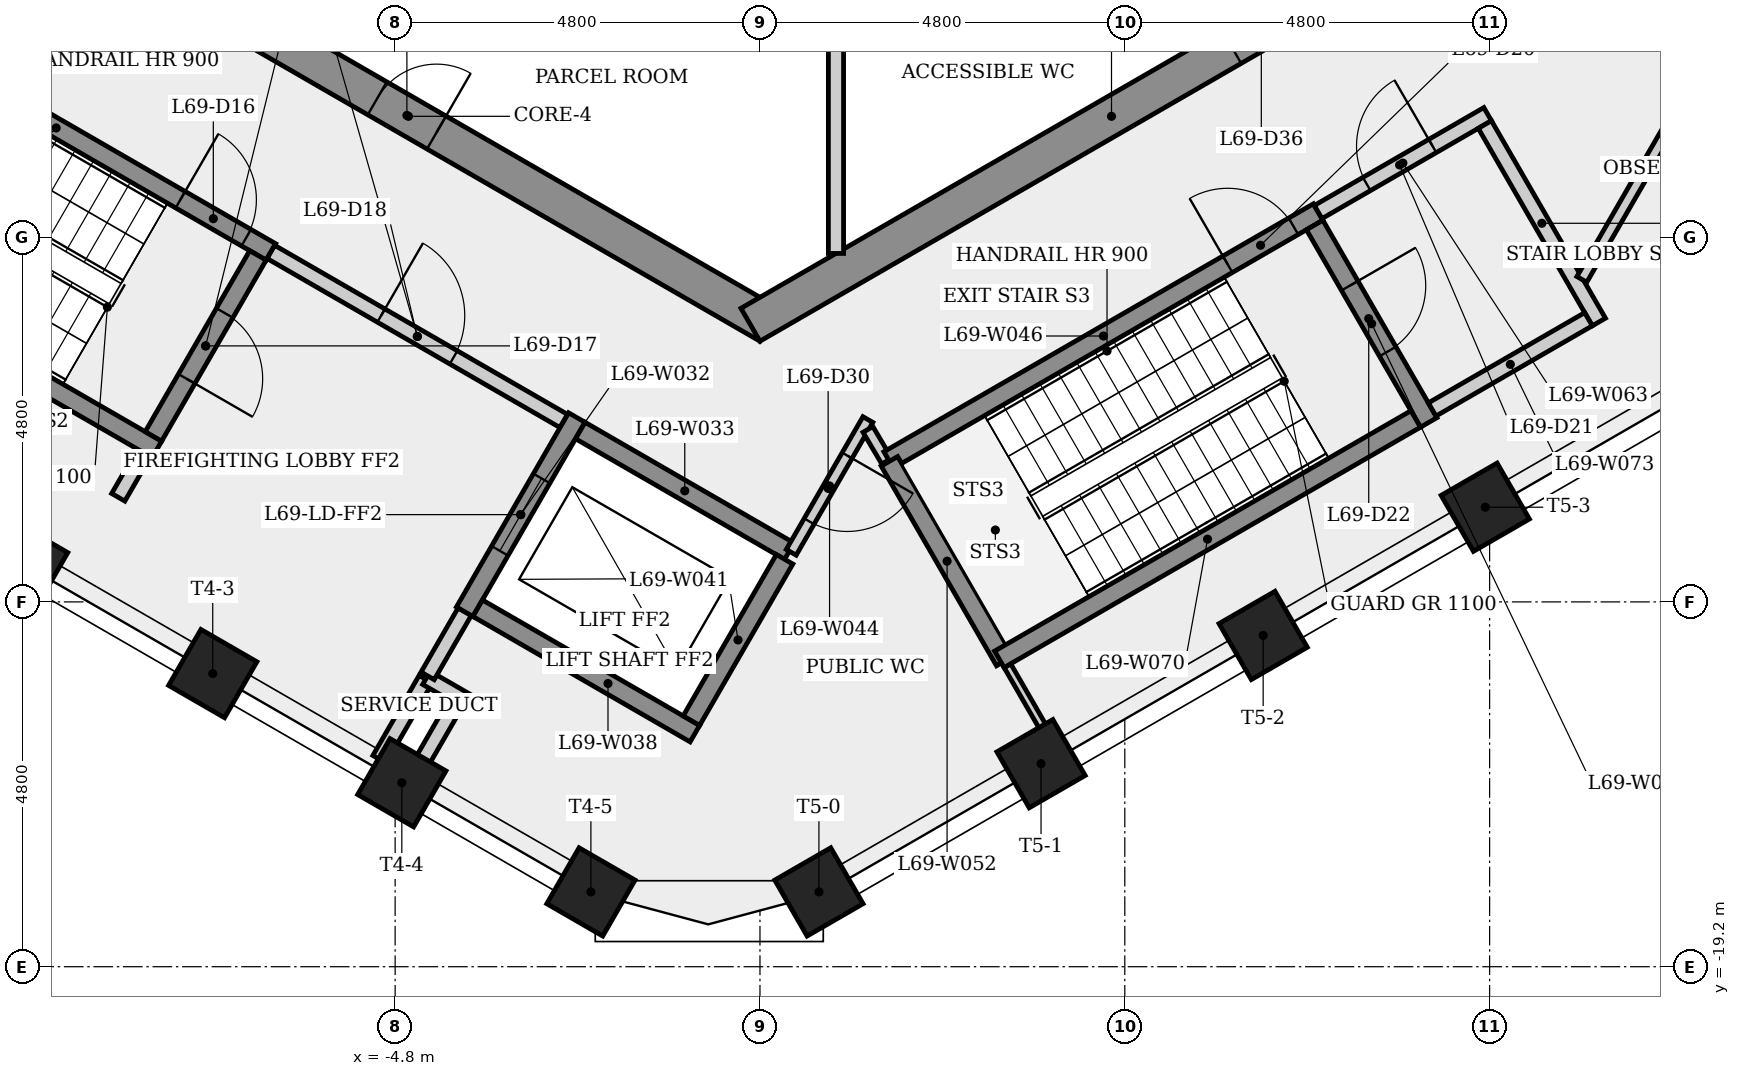
"""IFC4 building model, lengths in metres.
Left out: names, types, materials, properties, quantities, classifications, styles, units other than length and angle.
Written with IfcOpenShell. Run it as: python <this file> out.ifc"""

import sys

from ifc_helpers import new_model, si_unit, direction, frame, frame_2d, origin, origin_2d, place, context, subcontext, project, spatial, rectangle, extrude, element, fill, save


model = new_model("IFC4")
c1 = context("Model", 3, precision=1e-05, world=origin(), true_north=direction((0.0, 1.0)))
c2 = subcontext(c1, "Body", "Model", "MODEL_VIEW")
j1 = project(units=[si_unit("LENGTHUNIT", "METRE"), si_unit("PLANEANGLEUNIT", "RADIAN")], contexts=[c1])
p1 = place(None, origin())
s1 = spatial("IfcSite", under=j1, at=p1, CompositionType="ELEMENT")
p2 = place(p1, origin())
s2 = spatial("IfcBuilding", under=s1, at=p2, CompositionType="ELEMENT")
p3 = place(p2, frame((0.0, 0.0, 257.9)))
s3 = spatial("IfcBuildingStorey", under=s2, at=p3, CompositionType="ELEMENT", Elevation=257.9)
p4 = place(p3, frame((-9.375, -5.268, 0.0), z_axis=(0.0, 0.0, 1.0), x_axis=(0.866023993627, -0.500002442456, 0.0)))
e1 = element("IfcWall", 1, at=p4, inside=s3, PredefinedType="SHEAR", context=c2, shape_type="SweptSolid", body=[
    extrude(rectangle(XDim=10.97, YDim=0.5, at=frame_2d((5.485, 0.0))), origin(), (0.0, 0.0, 1.0), 5.0),
])
p5 = place(p4, frame((5.011, 0.0, 0.0)))
e2 = element("IfcOpeningElement", 2, at=p5, cuts=e1, PredefinedType="OPENING", context=c2, shape_type="SweptSolid", body=[
    extrude(rectangle(XDim=0.9, YDim=2.1, at=frame_2d((0.45, 1.05))), frame((0.0, 0.26, 0.0), z_axis=(0.0, -1.0, 0.0), x_axis=(1.0, 0.0, 0.0)), (0.0, 0.0, 1.0), 0.52),
])
p6 = place(p3, frame((-0.125, -10.753, 0.0), z_axis=(0.0, 0.0, 1.0), x_axis=(0.866023993627, 0.500002442456, 0.0)))
e3 = element("IfcWall", 3, at=p6, inside=s3, PredefinedType="SHEAR", context=c2, shape_type="SweptSolid", body=[
    extrude(rectangle(XDim=10.97, YDim=0.5, at=frame_2d((5.485, 0.0))), origin(), (0.0, 0.0, 1.0), 5.0),
])
p7 = place(p6, frame((7.311, 0.0, 0.0)))
e4 = element("IfcOpeningElement", 4, at=p7, cuts=e3, PredefinedType="OPENING", context=c2, shape_type="SweptSolid", body=[
    extrude(rectangle(XDim=0.9, YDim=2.1, at=frame_2d((0.45, 1.05))), frame((0.0, 0.26, 0.0), z_axis=(0.0, -1.0, 0.0), x_axis=(1.0, 0.0, 0.0)), (0.0, 0.0, 1.0), 0.52),
])
for number, where, z_axis, x_axis in (
    (5, (-9.688, -13.907, 0.0), (0.0, 0.0, 1.0), (-0.5, -0.866, 0.0)),
    (6, (-7.2, -15.343, 0.0), (0.0, 0.0, 1.0), (-0.5, -0.866, 0.0)),
    (7, (-4.712, -16.78, 0.0), (0.0, 0.0, 1.0), (-0.5, -0.866, 0.0)),
    (8, (-2.224, -18.216, 0.0), (0.0, 0.0, 1.0), (-0.5, -0.866, 0.0)),
    (9, (0.776, -18.216, 0.0), (0.0, 0.0, 1.0), (0.5, -0.866, 0.0)),
    (10, (3.698, -16.529, 0.0), (0.0, 0.0, 1.0), (0.5, -0.866, 0.0)),
    (11, (6.62, -14.841, 0.0), (0.0, 0.0, 1.0), (0.5, -0.866, 0.0)),
    (12, (9.543, -13.154, 0.0), (0.0, 0.0, 1.0), (0.5, -0.866, 0.0)),
):
    element("IfcColumn", number, at=place(p3, frame(where, z_axis=z_axis, x_axis=x_axis)), inside=s3, PredefinedType="COLUMN", context=c2, shape_type="SweptSolid", body=[
        extrude(rectangle(XDim=0.85, YDim=0.85, at=origin_2d()), origin(), (0.0, 0.0, 1.0), 5.0),
    ])
p8 = place(p3, frame((-12.085, -6.532, 0.0), z_axis=(0.0, 0.0, 1.0), x_axis=(0.866031063448, -0.499990197047, 0.0)))
e13 = element("IfcWall", 13, at=p8, inside=s3, PredefinedType="SHEAR", context=c2, shape_type="SweptSolid", body=[
    extrude(rectangle(XDim=6.525, YDim=0.25, at=frame_2d((3.263, 0.0))), origin(), (0.0, 0.0, 1.0), 4.6),
])
p9 = place(p8, frame((5.15, 0.0, 0.0)))
e14 = element("IfcOpeningElement", 14, at=p9, cuts=e13, PredefinedType="OPENING", context=c2, shape_type="SweptSolid", body=[
    extrude(rectangle(XDim=1.0, YDim=2.1, at=frame_2d((0.5, 1.05))), frame((0.0, 0.135, 0.0), z_axis=(0.0, -1.0, 0.0), x_axis=(1.0, 0.0, 0.0)), (0.0, 0.0, 1.0), 0.27),
])
p10 = place(p3, frame((-8.443, -13.023, 0.0), z_axis=(0.0, 0.0, 1.0), x_axis=(0.500066738792, 0.865986868696, 0.0)))
e15 = element("IfcWall", 15, at=p10, inside=s3, PredefinedType="PARTITIONING", context=c2, shape_type="SweptSolid", body=[
    extrude(rectangle(XDim=0.675, YDim=0.2, at=frame_2d((0.338, 0.0))), origin(), (0.0, 0.0, 1.0), 4.6),
])
p11 = place(p3, frame((-7.935, -12.393, 0.0), z_axis=(0.0, 0.0, 1.0), x_axis=(-0.866031063448, 0.499990197047, 0.0)))
e16 = element("IfcWall", 16, at=p11, inside=s3, PredefinedType="SHEAR", context=c2, shape_type="SweptSolid", body=[
    extrude(rectangle(XDim=6.525, YDim=0.25, at=frame_2d((3.263, 0.0))), origin(), (0.0, 0.0, 1.0), 4.6),
])
p12 = place(p3, frame((-6.605, -9.841, 0.0), z_axis=(0.0, 0.0, 1.0), x_axis=(-0.499996545922, -0.866027397988, 0.0)))
e17 = element("IfcWall", 17, at=p12, inside=s3, PredefinedType="SHEAR", context=c2, shape_type="SweptSolid", body=[
    extrude(rectangle(XDim=2.75, YDim=0.25, at=frame_2d((1.375, 0.0))), origin(), (0.0, 0.0, 1.0), 4.6),
])
p13 = place(p12, frame((0.875, 0.0, 0.0)))
e18 = element("IfcOpeningElement", 18, at=p13, cuts=e17, PredefinedType="OPENING", context=c2, shape_type="SweptSolid", body=[
    extrude(rectangle(XDim=1.0, YDim=2.1, at=frame_2d((0.5, 1.05))), frame((0.0, 0.135, 0.0), z_axis=(0.0, -1.0, 0.0), x_axis=(1.0, 0.0, 0.0)), (0.0, 0.0, 1.0), 0.27),
])
p14 = place(p3, frame((-6.435, -9.795, 0.0), z_axis=(0.0, 0.0, 1.0), x_axis=(0.866012907634, -0.500021643343, 0.0)))
e19 = element("IfcWall", 19, at=p14, inside=s3, PredefinedType="PARTITIONING", context=c2, shape_type="SweptSolid", body=[
    extrude(rectangle(XDim=4.45, YDim=0.2, at=frame_2d((2.225, 0.0))), origin(), (0.0, 0.0, 1.0), 4.6),
])
p15 = place(p14, frame((1.675, 0.0, 0.0)))
e20 = element("IfcOpeningElement", 20, at=p15, cuts=e19, PredefinedType="OPENING", context=c2, shape_type="SweptSolid", body=[
    extrude(rectangle(XDim=1.1, YDim=2.1, at=frame_2d((0.55, 1.05))), frame((0.0, 0.11, 0.0), z_axis=(0.0, -1.0, 0.0), x_axis=(1.0, 0.0, 0.0)), (0.0, 0.0, 1.0), 0.22),
])
p16 = place(p3, frame((-5.006, -16.471, 0.0), z_axis=(0.0, 0.0, 1.0), x_axis=(0.499913398087, 0.866075397649, 0.0)))
e21 = element("IfcWall", 21, at=p16, inside=s3, PredefinedType="PLUMBINGWALL", context=c2, shape_type="SweptSolid", body=[
    extrude(rectangle(XDim=1.218, YDim=0.2, at=frame_2d((0.609, 0.0))), origin(), (0.0, 0.0, 1.0), 4.6),
])
for number, where, z_axis, x_axis in (
    (22, (-4.497, -16.788, 0.0), (0.0, 0.0, 1.0), (-0.866, 0.5, 0.0)),
    (23, (-4.387, -15.399, 0.0), (0.0, 0.0, 1.0), (0.866, -0.5, 0.0)),
):
    element("IfcWall", number, at=place(p3, frame(where, z_axis=z_axis, x_axis=x_axis)), inside=s3, PredefinedType="PLUMBINGWALL", context=c2, shape_type="SweptSolid", body=[
        extrude(rectangle(XDim=0.6, YDim=0.2, at=frame_2d((0.3, 0.0))), origin(), (0.0, 0.0, 1.0), 4.6),
    ])
p17 = place(p3, frame((-4.004, -15.736, 0.0), z_axis=(0.0, 0.0, 1.0), x_axis=(-0.500062184469, -0.865989498588, 0.0)))
e24 = element("IfcWall", 24, at=p17, inside=s3, PredefinedType="PLUMBINGWALL", context=c2, shape_type="SweptSolid", body=[
    extrude(rectangle(XDim=1.057, YDim=0.2, at=frame_2d((0.529, 0.0))), origin(), (0.0, 0.0, 1.0), 4.6),
])
p18 = place(p3, frame((-3.885, -14.529, 0.0), z_axis=(0.0, 0.0, 1.0), x_axis=(-0.49998975084, -0.866031321059, 0.0)))
e25 = element("IfcWall", 25, at=p18, inside=s3, PredefinedType="PARTITIONING", context=c2, shape_type="SweptSolid", body=[
    extrude(rectangle(XDim=0.975, YDim=0.2, at=frame_2d((0.488, 0.0))), origin(), (0.0, 0.0, 1.0), 4.6),
])
p19 = place(p3, frame((-2.41, -11.974, 0.0), z_axis=(0.0, 0.0, 1.0), x_axis=(-0.500001826776, -0.866024349092, 0.0)))
e26 = element("IfcWall", 26, at=p19, inside=s3, PredefinedType="SHEAR", context=c2, shape_type="SweptSolid", body=[
    extrude(rectangle(XDim=2.95, YDim=0.25, at=frame_2d((1.475, 0.0))), origin(), (0.0, 0.0, 1.0), 4.6),
])
p20 = place(p19, frame((0.925, 0.0, 0.0)))
e27 = element("IfcOpeningElement", 27, at=p20, cuts=e26, PredefinedType="OPENING", context=c2, shape_type="SweptSolid", body=[
    extrude(rectangle(XDim=1.1, YDim=2.1, at=frame_2d((0.55, 1.05))), frame((0.0, 0.135, 0.0), z_axis=(0.0, -1.0, 0.0), x_axis=(1.0, 0.0, 0.0)), (0.0, 0.0, 1.0), 0.27),
])
p21 = place(p3, frame((-2.364, -12.145, 0.0), z_axis=(0.0, 0.0, 1.0), x_axis=(0.866048579423, -0.499959856469, 0.0)))
e28 = element("IfcWall", 28, at=p21, inside=s3, PredefinedType="SHEAR", context=c2, shape_type="SweptSolid", body=[
    extrude(rectangle(XDim=3.175, YDim=0.25, at=frame_2d((1.587, 0.0))), origin(), (0.0, 0.0, 1.0), 5.0),
])
p22 = place(p3, frame((-0.856, -16.133, 0.0), z_axis=(0.0, 0.0, 1.0), x_axis=(-0.866021716278, 0.500006386895, 0.0)))
e29 = element("IfcWall", 29, at=p22, inside=s3, PredefinedType="SHEAR", context=c2, shape_type="SweptSolid", body=[
    extrude(rectangle(XDim=3.3, YDim=0.25, at=frame_2d((1.65, 0.0))), origin(), (0.0, 0.0, 1.0), 4.6),
])
p23 = place(p3, frame((0.324, -13.839, 0.0), z_axis=(0.0, 0.0, 1.0), x_axis=(-0.500015484165, -0.866016463813, 0.0)))
e30 = element("IfcWall", 30, at=p23, inside=s3, PredefinedType="SHEAR", context=c2, shape_type="SweptSolid", body=[
    extrude(rectangle(XDim=2.452, YDim=0.25, at=frame_2d((1.226, 0.0))), origin(), (0.0, 0.0, 1.0), 5.0),
])
p24 = place(p3, frame((1.0, -5.25, 0.0), z_axis=(0.0, 0.0, 1.0), x_axis=(0.0, -1.0, 0.0)))
e31 = element("IfcWall", 31, at=p24, inside=s3, PredefinedType="PARTITIONING", context=c2, shape_type="SweptSolid", body=[
    extrude(rectangle(XDim=4.565, YDim=0.2, at=frame_2d((2.282, 0.0))), origin(), (0.0, 0.0, 1.0), 4.6),
])
p25 = place(p3, frame((1.42, -12.0, 0.0), z_axis=(0.0, 0.0, 1.0), x_axis=(-0.499952933402, -0.866052575992, 0.0)))
e32 = element("IfcWall", 32, at=p25, inside=s3, PredefinedType="PARTITIONING", context=c2, shape_type="SweptSolid", body=[
    extrude(rectangle(XDim=2.017, YDim=0.15, at=frame_2d((1.009, 0.0))), origin(), (0.0, 0.0, 1.0), 4.6),
])
p26 = place(p25, frame((0.546, 0.0, 0.0)))
e33 = element("IfcOpeningElement", 33, at=p26, cuts=e32, PredefinedType="OPENING", context=c2, shape_type="SweptSolid", body=[
    extrude(rectangle(XDim=1.0, YDim=2.1, at=frame_2d((0.5, 1.05))), frame((0.0, 0.085, 0.0), z_axis=(0.0, -1.0, 0.0), x_axis=(1.0, 0.0, 0.0)), (0.0, 0.0, 1.0), 0.17),
])
p27 = place(p3, frame((1.667, -12.548, 0.0), z_axis=(0.0, 0.0, 1.0), x_axis=(-0.508186221736, 0.861247214241, 0.0)))
e34 = element("IfcWall", 34, at=p27, inside=s3, PredefinedType="PARTITIONING", context=c2, shape_type="SweptSolid", body=[
    extrude(rectangle(XDim=0.485, YDim=0.15, at=frame_2d((0.242, 0.0))), origin(), (0.0, 0.0, 1.0), 4.6),
])
p28 = place(p3, frame((1.693, -12.532, 0.0), z_axis=(0.0, 0.0, 1.0), x_axis=(0.866031063448, 0.499990197047, 0.0)))
e35 = element("IfcWall", 35, at=p28, inside=s3, PredefinedType="SHEAR", context=c2, shape_type="SweptSolid", body=[
    extrude(rectangle(XDim=6.525, YDim=0.25, at=frame_2d((3.263, 0.0))), origin(), (0.0, 0.0, 1.0), 4.6),
])
p29 = place(p28, frame((5.15, 0.0, 0.0)))
e36 = element("IfcOpeningElement", 36, at=p29, cuts=e35, PredefinedType="OPENING", context=c2, shape_type="SweptSolid", body=[
    extrude(rectangle(XDim=1.0, YDim=2.1, at=frame_2d((0.5, 1.05))), frame((0.0, 0.135, 0.0), z_axis=(0.0, -1.0, 0.0), x_axis=(1.0, 0.0, 0.0)), (0.0, 0.0, 1.0), 0.27),
])
p30 = place(p3, frame((3.221, -15.178, 0.0), z_axis=(0.0, 0.0, 1.0), x_axis=(-0.500014901547, 0.866016800201, 0.0)))
e37 = element("IfcWall", 37, at=p30, inside=s3, PredefinedType="SHEAR", context=c2, shape_type="SweptSolid", body=[
    extrude(rectangle(XDim=3.035, YDim=0.25, at=frame_2d((1.518, 0.0))), origin(), (0.0, 0.0, 1.0), 4.6),
])
p31 = place(p3, frame((3.947, -16.436, 0.0), z_axis=(0.0, 0.0, 1.0), x_axis=(-0.499977339252, 0.866038486578, 0.0)))
e38 = element("IfcWall", 38, at=p31, inside=s3, PredefinedType="PARTITIONING", context=c2, shape_type="SweptSolid", body=[
    extrude(rectangle(XDim=1.382, YDim=0.1, at=frame_2d((0.691, 0.0))), origin(), (0.0, 0.0, 1.0), 4.6),
])
p32 = place(p3, frame((7.298, -9.441, 0.0), z_axis=(0.0, 0.0, 1.0), x_axis=(0.50002537861, -0.866010750942, 0.0)))
e39 = element("IfcWall", 39, at=p32, inside=s3, PredefinedType="SHEAR", context=c2, shape_type="SweptSolid", body=[
    extrude(rectangle(XDim=3.0, YDim=0.25, at=frame_2d((1.5, 0.0))), origin(), (0.0, 0.0, 1.0), 4.6),
])
p33 = place(p32, frame((0.923, 0.0, 0.0)))
e40 = element("IfcOpeningElement", 40, at=p33, cuts=e39, PredefinedType="OPENING", context=c2, shape_type="SweptSolid", body=[
    extrude(rectangle(XDim=1.0, YDim=2.1, at=frame_2d((0.5, 1.05))), frame((0.0, 0.135, 0.0), z_axis=(0.0, -1.0, 0.0), x_axis=(1.0, 0.0, 0.0)), (0.0, 0.0, 1.0), 0.27),
])
p34 = place(p3, frame((7.344, -9.27, 0.0), z_axis=(0.0, 0.0, 1.0), x_axis=(0.866005588531, 0.500034319456, 0.0)))
e41 = element("IfcWall", 41, at=p34, inside=s3, PredefinedType="PARTITIONING", context=c2, shape_type="SweptSolid", body=[
    extrude(rectangle(XDim=2.575, YDim=0.2, at=frame_2d((1.288, 0.0))), origin(), (0.0, 0.0, 1.0), 4.6),
])
p35 = place(p34, frame((0.738, 0.0, 0.0)))
e42 = element("IfcOpeningElement", 42, at=p35, cuts=e41, PredefinedType="OPENING", context=c2, shape_type="SweptSolid", body=[
    extrude(rectangle(XDim=1.0, YDim=2.1, at=frame_2d((0.5, 1.05))), frame((0.0, 0.11, 0.0), z_axis=(0.0, -1.0, 0.0), x_axis=(1.0, 0.0, 0.0)), (0.0, 0.0, 1.0), 0.22),
])
p36 = place(p3, frame((8.627, -11.993, 0.0), z_axis=(0.0, 0.0, 1.0), x_axis=(-0.866032601554, -0.49998753289, 0.0)))
e43 = element("IfcWall", 43, at=p36, inside=s3, PredefinedType="SHEAR", context=c2, shape_type="SweptSolid", body=[
    extrude(rectangle(XDim=6.325, YDim=0.25, at=frame_2d((3.163, 0.0))), origin(), (0.0, 0.0, 1.0), 4.6),
])
p37 = place(p3, frame((9.537, -8.119, 0.0), z_axis=(0.0, 0.0, 1.0), x_axis=(0.499990139034, -0.866031096941, 0.0)))
e44 = element("IfcWall", 44, at=p37, inside=s3, PredefinedType="PARTITIONING", context=c2, shape_type="SweptSolid", body=[
    extrude(rectangle(XDim=3.0, YDim=0.2, at=frame_2d((1.5, 0.0))), origin(), (0.0, 0.0, 1.0), 4.6),
])
p38 = place(p3, frame((10.901, -10.681, 0.0), z_axis=(0.0, 0.0, 1.0), x_axis=(-0.866007538022, -0.500030943131, 0.0)))
e45 = element("IfcWall", 45, at=p38, inside=s3, PredefinedType="PARTITIONING", context=c2, shape_type="SweptSolid", body=[
    extrude(rectangle(XDim=2.375, YDim=0.2, at=frame_2d((1.188, 0.0))), origin(), (0.0, 0.0, 1.0), 4.6),
])
p39 = place(p3, frame((14.135, -4.404, 0.0), z_axis=(0.0, 0.0, 1.0), x_axis=(-0.500001386856, -0.866024603081, 0.0)))
e46 = element("IfcWall", 46, at=p39, inside=s3, PredefinedType="PARTITIONING", context=c2, shape_type="SweptSolid", body=[
    extrude(rectangle(XDim=6.642, YDim=0.15, at=frame_2d((3.321, 0.0))), origin(), (0.0, 0.0, 1.0), 4.6),
])
p40 = place(p39, frame((2.821, 0.0, 0.0)))
e47 = element("IfcOpeningElement", 47, at=p40, cuts=e46, PredefinedType="OPENING", context=c2, shape_type="SweptSolid", body=[
    extrude(rectangle(XDim=1.0, YDim=2.1, at=frame_2d((0.5, 1.05))), frame((0.0, 0.085, 0.0), z_axis=(0.0, -1.0, 0.0), x_axis=(1.0, 0.0, 0.0)), (0.0, 0.0, 1.0), 0.17),
])
p41 = place(p9, origin())
e48 = element("IfcDoor", 48, at=p41, inside=s3, OperationType="SINGLE_SWING_LEFT", PredefinedType="DOOR", context=c2, shape_type="SweptSolid", body=[
    extrude(rectangle(XDim=1.0, YDim=2.1, at=frame_2d((0.5, 1.05))), frame((0.0, 0.025, 0.0), z_axis=(0.0, -1.0, 0.0), x_axis=(1.0, 0.0, 0.0)), (0.0, 0.0, 1.0), 0.05),
])
fill(e14, e48)
p42 = place(p13, origin())
e49 = element("IfcDoor", 49, at=p42, inside=s3, OperationType="SINGLE_SWING_RIGHT", PredefinedType="DOOR", context=c2, shape_type="SweptSolid", body=[
    extrude(rectangle(XDim=1.0, YDim=2.1, at=frame_2d((0.5, 1.05))), frame((0.0, 0.025, 0.0), z_axis=(0.0, -1.0, 0.0), x_axis=(1.0, 0.0, 0.0)), (0.0, 0.0, 1.0), 0.05),
])
fill(e18, e49)
p43 = place(p15, origin())
e50 = element("IfcDoor", 50, at=p43, inside=s3, OperationType="SINGLE_SWING_LEFT", PredefinedType="DOOR", context=c2, shape_type="SweptSolid", body=[
    extrude(rectangle(XDim=1.1, YDim=2.1, at=frame_2d((0.55, 1.05))), frame((0.0, 0.025, 0.0), z_axis=(0.0, -1.0, 0.0), x_axis=(1.0, 0.0, 0.0)), (0.0, 0.0, 1.0), 0.05),
])
fill(e20, e50)
p44 = place(p20, origin())
e51 = element("IfcDoor", 51, at=p44, inside=s3, OperationType="SLIDING_TO_LEFT", PredefinedType="DOOR", context=c2, shape_type="SweptSolid", body=[
    extrude(rectangle(XDim=1.1, YDim=2.1, at=frame_2d((0.55, 1.05))), frame((0.0, 0.025, 0.0), z_axis=(0.0, -1.0, 0.0), x_axis=(1.0, 0.0, 0.0)), (0.0, 0.0, 1.0), 0.05),
])
fill(e27, e51)
p45 = place(p29, origin())
e52 = element("IfcDoor", 52, at=p45, inside=s3, OperationType="SINGLE_SWING_LEFT", PredefinedType="DOOR", context=c2, shape_type="SweptSolid", body=[
    extrude(rectangle(XDim=1.0, YDim=2.1, at=frame_2d((0.5, 1.05))), frame((0.0, 0.025, 0.0), z_axis=(0.0, -1.0, 0.0), x_axis=(1.0, 0.0, 0.0)), (0.0, 0.0, 1.0), 0.05),
])
fill(e36, e52)
p46 = place(p35, origin())
e53 = element("IfcDoor", 53, at=p46, inside=s3, OperationType="SINGLE_SWING_RIGHT", PredefinedType="DOOR", context=c2, shape_type="SweptSolid", body=[
    extrude(rectangle(XDim=1.0, YDim=2.1, at=frame_2d((0.5, 1.05))), frame((0.0, 0.025, 0.0), z_axis=(0.0, -1.0, 0.0), x_axis=(1.0, 0.0, 0.0)), (0.0, 0.0, 1.0), 0.05),
])
fill(e42, e53)
p47 = place(p33, origin())
e54 = element("IfcDoor", 54, at=p47, inside=s3, OperationType="SINGLE_SWING_LEFT", PredefinedType="DOOR", context=c2, shape_type="SweptSolid", body=[
    extrude(rectangle(XDim=1.0, YDim=2.1, at=frame_2d((0.5, 1.05))), frame((0.0, 0.025, 0.0), z_axis=(0.0, -1.0, 0.0), x_axis=(1.0, 0.0, 0.0)), (0.0, 0.0, 1.0), 0.05),
])
fill(e40, e54)
p48 = place(p26, origin())
e55 = element("IfcDoor", 55, at=p48, inside=s3, OperationType="SINGLE_SWING_LEFT", PredefinedType="DOOR", context=c2, shape_type="SweptSolid", body=[
    extrude(rectangle(XDim=1.0, YDim=2.1, at=frame_2d((0.5, 1.05))), frame((0.0, 0.025, 0.0), z_axis=(0.0, -1.0, 0.0), x_axis=(1.0, 0.0, 0.0)), (0.0, 0.0, 1.0), 0.05),
])
fill(e33, e55)
p49 = place(p5, origin())
e56 = element("IfcDoor", 56, at=p49, inside=s3, OperationType="SINGLE_SWING_RIGHT", PredefinedType="DOOR", context=c2, shape_type="SweptSolid", body=[
    extrude(rectangle(XDim=0.9, YDim=2.1, at=frame_2d((0.45, 1.05))), frame((0.0, 0.025, 0.0), z_axis=(0.0, -1.0, 0.0), x_axis=(1.0, 0.0, 0.0)), (0.0, 0.0, 1.0), 0.05),
])
fill(e2, e56)
save(model, sys.argv[1])
